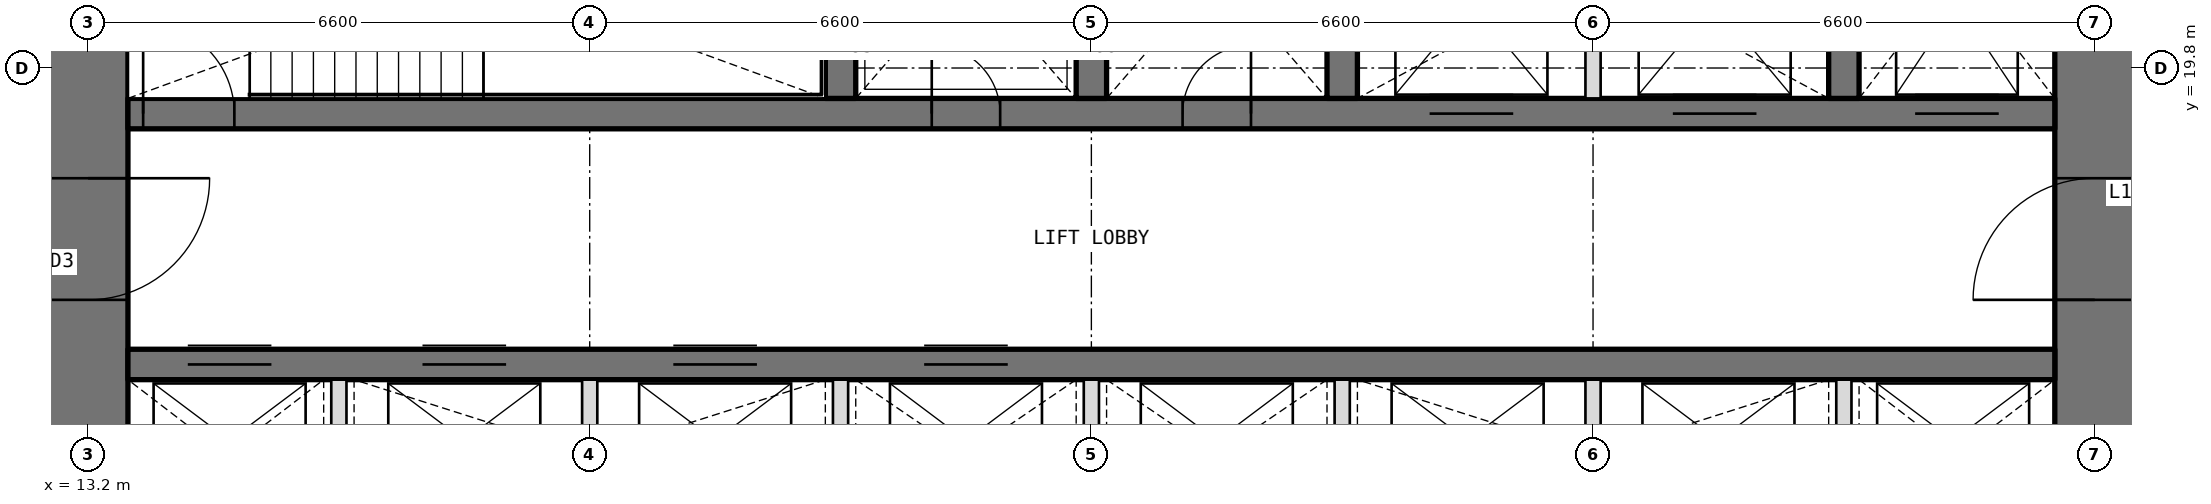
"""IFC4 building model, lengths in metres.
Left out: names, types, materials, properties, quantities, classifications, styles, units other than length and angle.
Written with IfcOpenShell. Run it as: python <this file> out.ifc"""

import sys

from ifc_helpers import new_model, si_unit, direction, frame, frame_2d, origin, place, context, subcontext, project, spatial, rectangle, extrude, element, fill, save


model = new_model("IFC4")
c1 = context("Model", 3, precision=1e-05, world=origin(), true_north=direction((0.0, 1.0)))
c2 = subcontext(c1, "Body", "Model", "MODEL_VIEW")
j1 = project(units=[si_unit("LENGTHUNIT", "METRE"), si_unit("PLANEANGLEUNIT", "RADIAN")], contexts=[c1])
p1 = place(None, origin())
s1 = spatial("IfcSite", under=j1, at=p1, CompositionType="ELEMENT")
p2 = place(p1, origin())
s2 = spatial("IfcBuilding", under=s1, at=p2, CompositionType="ELEMENT")
p3 = place(p2, frame((0.0, 0.0, 54.9)))
s3 = spatial("IfcBuildingStorey", under=s2, at=p3, CompositionType="ELEMENT", Elevation=54.9)
p4 = place(p3, frame((39.6, 13.725, 0.0), z_axis=(0.0, 0.0, 1.0), x_axis=(0.0, 1.0, 0.0)))
e1 = element("IfcWall", 1, at=p4, inside=s3, PredefinedType="SHEAR", context=c2, shape_type="SweptSolid", body=[
    extrude(rectangle(XDim=18.75, YDim=1.05, at=frame_2d((9.375, 0.0))), origin(), (0.0, 0.0, 1.0), 4.2),
])
p5 = place(p4, frame((3.025, 0.0, 0.0)))
e2 = element("IfcOpeningElement", 2, at=p5, cuts=e1, PredefinedType="OPENING", context=c2, shape_type="SweptSolid", body=[
    extrude(rectangle(XDim=1.6, YDim=2.1, at=frame_2d((0.8, 1.05))), frame((0.0, 0.535, 0.0), z_axis=(0.0, -1.0, 0.0), x_axis=(1.0, 0.0, 0.0)), (0.0, 0.0, 1.0), 1.07),
])
p6 = place(p4, frame((13.825, 0.0, 0.0)))
e3 = element("IfcOpeningElement", 3, at=p6, cuts=e1, PredefinedType="OPENING", context=c2, shape_type="SweptSolid", body=[
    extrude(rectangle(XDim=1.6, YDim=2.1, at=frame_2d((0.8, 1.05))), frame((0.0, 0.535, 0.0), z_axis=(0.0, -1.0, 0.0), x_axis=(1.0, 0.0, 0.0)), (0.0, 0.0, 1.0), 1.07),
])
p7 = place(p3, frame((13.2, 32.475, 0.0), z_axis=(0.0, 0.0, 1.0), x_axis=(0.0, -1.0, 0.0)))
e4 = element("IfcWall", 4, at=p7, inside=s3, PredefinedType="SHEAR", context=c2, shape_type="SweptSolid", body=[
    extrude(rectangle(XDim=18.75, YDim=1.05, at=frame_2d((9.375, 0.0))), origin(), (0.0, 0.0, 1.0), 4.2),
])
p8 = place(p7, frame((14.125, 0.0, 0.0)))
e5 = element("IfcOpeningElement", 5, at=p8, cuts=e4, PredefinedType="OPENING", context=c2, shape_type="SweptSolid", body=[
    extrude(rectangle(XDim=1.6, YDim=2.1, at=frame_2d((0.8, 1.05))), frame((0.0, 0.535, 0.0), z_axis=(0.0, -1.0, 0.0), x_axis=(1.0, 0.0, 0.0)), (0.0, 0.0, 1.0), 1.07),
])
p9 = place(p7, frame((3.325, 0.0, 0.0)))
e6 = element("IfcOpeningElement", 6, at=p9, cuts=e4, PredefinedType="OPENING", context=c2, shape_type="SweptSolid", body=[
    extrude(rectangle(XDim=1.6, YDim=2.1, at=frame_2d((0.8, 1.05))), frame((0.0, 0.535, 0.0), z_axis=(0.0, -1.0, 0.0), x_axis=(1.0, 0.0, 0.0)), (0.0, 0.0, 1.0), 1.07),
])
p10 = place(p3, frame((13.725, 15.9, 0.0), z_axis=(0.0, 0.0, 1.0), x_axis=(1.0, 0.0, 0.0)))
e7 = element("IfcWall", 7, at=p10, inside=s3, PredefinedType="SHEAR", context=c2, shape_type="SweptSolid", body=[
    extrude(rectangle(XDim=25.35, YDim=0.4, at=frame_2d((12.675, 0.0))), origin(), (0.0, 0.0, 1.0), 4.2),
])
p11 = place(p10, frame((0.788, 0.0, 0.0)))
e8 = element("IfcOpeningElement", 8, at=p11, cuts=e7, PredefinedType="OPENING", context=c2, shape_type="SweptSolid", body=[
    extrude(rectangle(XDim=1.1, YDim=2.1, at=frame_2d((0.55, 1.05))), frame((0.0, 0.21, 0.0), z_axis=(0.0, -1.0, 0.0), x_axis=(1.0, 0.0, 0.0)), (0.0, 0.0, 1.0), 0.42),
])
p12 = place(p10, frame((3.875, 0.0, 0.0)))
e9 = element("IfcOpeningElement", 9, at=p12, cuts=e7, PredefinedType="OPENING", context=c2, shape_type="SweptSolid", body=[
    extrude(rectangle(XDim=1.1, YDim=2.1, at=frame_2d((0.55, 1.05))), frame((0.0, 0.21, 0.0), z_axis=(0.0, -1.0, 0.0), x_axis=(1.0, 0.0, 0.0)), (0.0, 0.0, 1.0), 0.42),
])
p13 = place(p10, frame((7.175, 0.0, 0.0)))
e10 = element("IfcOpeningElement", 10, at=p13, cuts=e7, PredefinedType="OPENING", context=c2, shape_type="SweptSolid", body=[
    extrude(rectangle(XDim=1.1, YDim=2.1, at=frame_2d((0.55, 1.05))), frame((0.0, 0.21, 0.0), z_axis=(0.0, -1.0, 0.0), x_axis=(1.0, 0.0, 0.0)), (0.0, 0.0, 1.0), 0.42),
])
p14 = place(p10, frame((10.475, 0.0, 0.0)))
e11 = element("IfcOpeningElement", 11, at=p14, cuts=e7, PredefinedType="OPENING", context=c2, shape_type="SweptSolid", body=[
    extrude(rectangle(XDim=1.1, YDim=2.1, at=frame_2d((0.55, 1.05))), frame((0.0, 0.21, 0.0), z_axis=(0.0, -1.0, 0.0), x_axis=(1.0, 0.0, 0.0)), (0.0, 0.0, 1.0), 0.42),
])
p15 = place(p3, frame((13.725, 19.2, 0.0), z_axis=(0.0, 0.0, 1.0), x_axis=(1.0, 0.0, 0.0)))
e12 = element("IfcWall", 12, at=p15, inside=s3, PredefinedType="SHEAR", context=c2, shape_type="SweptSolid", body=[
    extrude(rectangle(XDim=25.35, YDim=0.4, at=frame_2d((12.675, 0.0))), origin(), (0.0, 0.0, 1.0), 4.2),
])
p16 = place(p15, frame((10.575, 0.0, 0.0)))
e13 = element("IfcOpeningElement", 13, at=p16, cuts=e12, PredefinedType="OPENING", context=c2, shape_type="SweptSolid", body=[
    extrude(rectangle(XDim=0.9, YDim=2.1, at=frame_2d((0.45, 1.05))), frame((0.0, 0.21, 0.0), z_axis=(0.0, -1.0, 0.0), x_axis=(1.0, 0.0, 0.0)), (0.0, 0.0, 1.0), 0.42),
])
p17 = place(p15, frame((13.875, 0.0, 0.0)))
e14 = element("IfcOpeningElement", 14, at=p17, cuts=e12, PredefinedType="OPENING", context=c2, shape_type="SweptSolid", body=[
    extrude(rectangle(XDim=0.9, YDim=2.1, at=frame_2d((0.45, 1.05))), frame((0.0, 0.21, 0.0), z_axis=(0.0, -1.0, 0.0), x_axis=(1.0, 0.0, 0.0)), (0.0, 0.0, 1.0), 0.42),
])
p18 = place(p15, frame((0.2, 0.0, 0.0)))
e15 = element("IfcOpeningElement", 15, at=p18, cuts=e12, PredefinedType="OPENING", context=c2, shape_type="SweptSolid", body=[
    extrude(rectangle(XDim=1.2, YDim=2.1, at=frame_2d((0.6, 1.05))), frame((0.0, 0.21, 0.0), z_axis=(0.0, -1.0, 0.0), x_axis=(1.0, 0.0, 0.0)), (0.0, 0.0, 1.0), 0.42),
])
p19 = place(p15, frame((23.512, 0.0, 0.0)))
e16 = element("IfcOpeningElement", 16, at=p19, cuts=e12, PredefinedType="OPENING", context=c2, shape_type="SweptSolid", body=[
    extrude(rectangle(XDim=1.1, YDim=2.1, at=frame_2d((0.55, 1.05))), frame((0.0, 0.21, 0.0), z_axis=(0.0, -1.0, 0.0), x_axis=(1.0, 0.0, 0.0)), (0.0, 0.0, 1.0), 0.42),
])
p20 = place(p15, frame((17.125, 0.0, 0.0)))
e17 = element("IfcOpeningElement", 17, at=p20, cuts=e12, PredefinedType="OPENING", context=c2, shape_type="SweptSolid", body=[
    extrude(rectangle(XDim=1.1, YDim=2.1, at=frame_2d((0.55, 1.05))), frame((0.0, 0.21, 0.0), z_axis=(0.0, -1.0, 0.0), x_axis=(1.0, 0.0, 0.0)), (0.0, 0.0, 1.0), 0.42),
])
p21 = place(p15, frame((20.325, 0.0, 0.0)))
e18 = element("IfcOpeningElement", 18, at=p21, cuts=e12, PredefinedType="OPENING", context=c2, shape_type="SweptSolid", body=[
    extrude(rectangle(XDim=1.1, YDim=2.1, at=frame_2d((0.55, 1.05))), frame((0.0, 0.21, 0.0), z_axis=(0.0, -1.0, 0.0), x_axis=(1.0, 0.0, 0.0)), (0.0, 0.0, 1.0), 0.42),
])
for number, where, z_axis, x_axis in (
    (19, (23.1, 19.4, 0.0), (0.0, 0.0, 1.0), (0.0, 1.0, 0.0)),
    (20, (26.4, 19.4, 0.0), (0.0, 0.0, 1.0), (0.0, 1.0, 0.0)),
    (21, (29.7, 19.4, 0.0), (0.0, 0.0, 1.0), (0.0, 1.0, 0.0)),
    (22, (36.3, 19.4, 0.0), (0.0, 0.0, 1.0), (0.0, 1.0, 0.0)),
):
    element("IfcWall", number, at=place(p3, frame(where, z_axis=z_axis, x_axis=x_axis)), inside=s3, PredefinedType="SHEAR", context=c2, shape_type="SweptSolid", body=[
        extrude(rectangle(XDim=3.35, YDim=0.4, at=frame_2d((1.675, 0.0))), origin(), (0.0, 0.0, 1.0), 4.2),
    ])
for number, where, z_axis, x_axis in (
    (23, (16.5, 13.725, 0.0), (0.0, 0.0, 1.0), (0.0, 1.0, 0.0)),
    (24, (19.8, 13.725, 0.0), (0.0, 0.0, 1.0), (0.0, 1.0, 0.0)),
    (25, (23.1, 13.725, 0.0), (0.0, 0.0, 1.0), (0.0, 1.0, 0.0)),
    (26, (26.4, 13.725, 0.0), (0.0, 0.0, 1.0), (0.0, 1.0, 0.0)),
    (27, (29.7, 13.725, 0.0), (0.0, 0.0, 1.0), (0.0, 1.0, 0.0)),
    (28, (33.0, 13.725, 0.0), (0.0, 0.0, 1.0), (0.0, 1.0, 0.0)),
    (29, (36.3, 13.725, 0.0), (0.0, 0.0, 1.0), (0.0, 1.0, 0.0)),
):
    element("IfcWall", number, at=place(p3, frame(where, z_axis=z_axis, x_axis=x_axis)), inside=s3, PredefinedType="PARTITIONING", context=c2, shape_type="SweptSolid", body=[
        extrude(rectangle(XDim=1.975, YDim=0.2, at=frame_2d((0.987, 0.0))), origin(), (0.0, 0.0, 1.0), 4.2),
    ])
p22 = place(p3, frame((33.0, 19.4, 0.0), z_axis=(0.0, 0.0, 1.0), x_axis=(0.0, 1.0, 0.0)))
e30 = element("IfcWall", 30, at=p22, inside=s3, PredefinedType="PARTITIONING", context=c2, shape_type="SweptSolid", body=[
    extrude(rectangle(XDim=3.35, YDim=0.2, at=frame_2d((1.675, 0.0))), origin(), (0.0, 0.0, 1.0), 4.2),
])
p23 = place(p16, origin())
e31 = element("IfcDoor", 31, at=p23, inside=s3, OperationType="SINGLE_SWING_LEFT", PredefinedType="DOOR", context=c2, shape_type="SweptSolid", body=[
    extrude(rectangle(XDim=0.9, YDim=2.1, at=frame_2d((0.45, 1.05))), frame((0.0, 0.025, 0.0), z_axis=(0.0, -1.0, 0.0), x_axis=(1.0, 0.0, 0.0)), (0.0, 0.0, 1.0), 0.05),
])
fill(e13, e31)
p24 = place(p17, origin())
e32 = element("IfcDoor", 32, at=p24, inside=s3, OperationType="SINGLE_SWING_RIGHT", PredefinedType="DOOR", context=c2, shape_type="SweptSolid", body=[
    extrude(rectangle(XDim=0.9, YDim=2.1, at=frame_2d((0.45, 1.05))), frame((0.0, 0.025, 0.0), z_axis=(0.0, -1.0, 0.0), x_axis=(1.0, 0.0, 0.0)), (0.0, 0.0, 1.0), 0.05),
])
fill(e14, e32)
p25 = place(p18, origin())
e33 = element("IfcDoor", 33, at=p25, inside=s3, OperationType="SINGLE_SWING_LEFT", PredefinedType="DOOR", context=c2, shape_type="SweptSolid", body=[
    extrude(rectangle(XDim=1.2, YDim=2.1, at=frame_2d((0.6, 1.05))), frame((0.0, 0.025, 0.0), z_axis=(0.0, -1.0, 0.0), x_axis=(1.0, 0.0, 0.0)), (0.0, 0.0, 1.0), 0.05),
])
fill(e15, e33)
p26 = place(p8, origin())
e34 = element("IfcDoor", 34, at=p26, inside=s3, OperationType="DOUBLE_DOOR_DOUBLE_SWING", PredefinedType="DOOR", context=c2, shape_type="SweptSolid", body=[
    extrude(rectangle(XDim=1.6, YDim=2.1, at=frame_2d((0.8, 1.05))), frame((0.0, 0.025, 0.0), z_axis=(0.0, -1.0, 0.0), x_axis=(1.0, 0.0, 0.0)), (0.0, 0.0, 1.0), 0.05),
])
fill(e5, e34)
p27 = place(p5, origin())
e35 = element("IfcDoor", 35, at=p27, inside=s3, OperationType="DOUBLE_DOOR_DOUBLE_SWING", PredefinedType="DOOR", context=c2, shape_type="SweptSolid", body=[
    extrude(rectangle(XDim=1.6, YDim=2.1, at=frame_2d((0.8, 1.05))), frame((0.0, 0.025, 0.0), z_axis=(0.0, -1.0, 0.0), x_axis=(1.0, 0.0, 0.0)), (0.0, 0.0, 1.0), 0.05),
])
fill(e2, e35)
p28 = place(p11, origin())
e36 = element("IfcDoor", 36, at=p28, inside=s3, OperationType="DOUBLE_DOOR_SLIDING", PredefinedType="DOOR", context=c2, shape_type="SweptSolid", body=[
    extrude(rectangle(XDim=1.1, YDim=2.1, at=frame_2d((0.55, 1.05))), frame((0.0, 0.025, 0.0), z_axis=(0.0, -1.0, 0.0), x_axis=(1.0, 0.0, 0.0)), (0.0, 0.0, 1.0), 0.05),
])
fill(e8, e36)
p29 = place(p12, origin())
e37 = element("IfcDoor", 37, at=p29, inside=s3, OperationType="DOUBLE_DOOR_SLIDING", PredefinedType="DOOR", context=c2, shape_type="SweptSolid", body=[
    extrude(rectangle(XDim=1.1, YDim=2.1, at=frame_2d((0.55, 1.05))), frame((0.0, 0.025, 0.0), z_axis=(0.0, -1.0, 0.0), x_axis=(1.0, 0.0, 0.0)), (0.0, 0.0, 1.0), 0.05),
])
fill(e9, e37)
p30 = place(p13, origin())
e38 = element("IfcDoor", 38, at=p30, inside=s3, OperationType="DOUBLE_DOOR_SLIDING", PredefinedType="DOOR", context=c2, shape_type="SweptSolid", body=[
    extrude(rectangle(XDim=1.1, YDim=2.1, at=frame_2d((0.55, 1.05))), frame((0.0, 0.025, 0.0), z_axis=(0.0, -1.0, 0.0), x_axis=(1.0, 0.0, 0.0)), (0.0, 0.0, 1.0), 0.05),
])
fill(e10, e38)
p31 = place(p14, origin())
e39 = element("IfcDoor", 39, at=p31, inside=s3, OperationType="DOUBLE_DOOR_SLIDING", PredefinedType="DOOR", context=c2, shape_type="SweptSolid", body=[
    extrude(rectangle(XDim=1.1, YDim=2.1, at=frame_2d((0.55, 1.05))), frame((0.0, 0.025, 0.0), z_axis=(0.0, -1.0, 0.0), x_axis=(1.0, 0.0, 0.0)), (0.0, 0.0, 1.0), 0.05),
])
fill(e11, e39)
p32 = place(p19, origin())
e40 = element("IfcDoor", 40, at=p32, inside=s3, OperationType="DOUBLE_DOOR_SLIDING", PredefinedType="DOOR", context=c2, shape_type="SweptSolid", body=[
    extrude(rectangle(XDim=1.1, YDim=2.1, at=frame_2d((0.55, 1.05))), frame((0.0, 0.025, 0.0), z_axis=(0.0, -1.0, 0.0), x_axis=(1.0, 0.0, 0.0)), (0.0, 0.0, 1.0), 0.05),
])
fill(e16, e40)
p33 = place(p20, origin())
e41 = element("IfcDoor", 41, at=p33, inside=s3, OperationType="DOUBLE_DOOR_SLIDING", PredefinedType="DOOR", context=c2, shape_type="SweptSolid", body=[
    extrude(rectangle(XDim=1.1, YDim=2.1, at=frame_2d((0.55, 1.05))), frame((0.0, 0.025, 0.0), z_axis=(0.0, -1.0, 0.0), x_axis=(1.0, 0.0, 0.0)), (0.0, 0.0, 1.0), 0.05),
])
fill(e17, e41)
p34 = place(p21, origin())
e42 = element("IfcDoor", 42, at=p34, inside=s3, OperationType="DOUBLE_DOOR_SLIDING", PredefinedType="DOOR", context=c2, shape_type="SweptSolid", body=[
    extrude(rectangle(XDim=1.1, YDim=2.1, at=frame_2d((0.55, 1.05))), frame((0.0, 0.025, 0.0), z_axis=(0.0, -1.0, 0.0), x_axis=(1.0, 0.0, 0.0)), (0.0, 0.0, 1.0), 0.05),
])
fill(e18, e42)
save(model, sys.argv[1])
